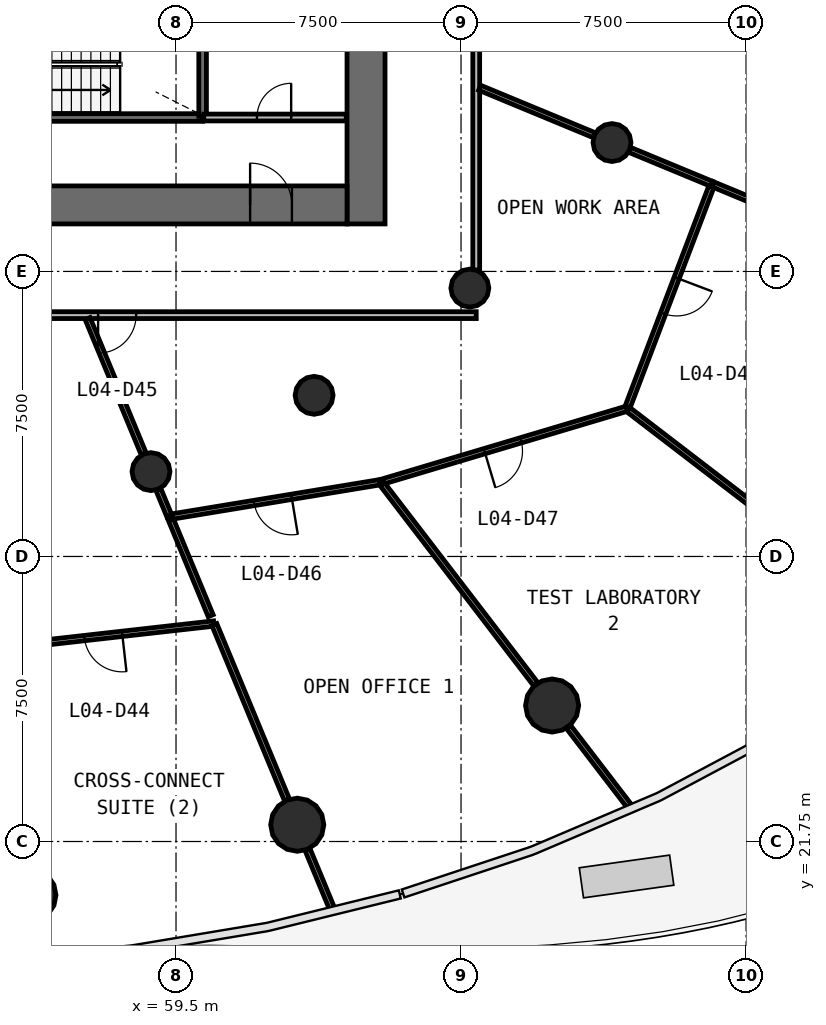
"""IFC4 building model, lengths in metres.
Left out: names, types, materials, properties, quantities, classifications, styles, units other than length and angle.
Written with IfcOpenShell. Run it as: python <this file> out.ifc"""

import sys

from ifc_helpers import new_model, si_unit, direction, frame, frame_2d, origin, origin_2d, place, context, subcontext, project, spatial, rectangle, circle, extrude, source, transform, mapped, element, fill, save


model = new_model("IFC4")
c1 = context("Model", 3, precision=1e-05, world=origin(), true_north=direction((0.0, 1.0)))
c2 = subcontext(c1, "Body", "Model", "MODEL_VIEW")
j1 = project(units=[si_unit("LENGTHUNIT", "METRE"), si_unit("PLANEANGLEUNIT", "RADIAN")], contexts=[c1])
p1 = place(None, origin())
s1 = spatial("IfcSite", under=j1, at=p1, CompositionType="ELEMENT")
p2 = place(p1, origin())
s2 = spatial("IfcBuilding", under=s1, at=p2, CompositionType="ELEMENT")
p3 = place(p2, frame((0.0, 0.0, 18.2)))
s3 = spatial("IfcBuildingStorey", under=s2, at=p3, CompositionType="ELEMENT", Elevation=18.2)
p4 = place(p3, frame((64.5, 38.0, 0.0), z_axis=(0.0, 0.0, 1.0), x_axis=(0.0, 1.0, 0.0)))
e1 = element("IfcWall", 1, at=p4, inside=s3, PredefinedType="SHEAR", context=c2, shape_type="SweptSolid", body=[
    extrude(rectangle(XDim=20.0, YDim=1.0, at=frame_2d((10.0, 0.0))), origin(), (0.0, 0.0, 1.0), 4.4),
])
p5 = place(p4, frame((9.1, 0.0, 0.0)))
e2 = element("IfcOpeningElement", 2, at=p5, cuts=e1, PredefinedType="OPENING", context=c2, shape_type="SweptSolid", body=[
    extrude(rectangle(XDim=1.8, YDim=2.1, at=frame_2d((0.9, 1.05))), frame((0.0, 0.51, 0.0), z_axis=(0.0, -1.0, 0.0), x_axis=(1.0, 0.0, 0.0)), (0.0, 0.0, 1.0), 1.02),
])
p6 = place(p3, frame((40.0, 38.5, 0.0), z_axis=(0.0, 0.0, 1.0), x_axis=(1.0, 0.0, 0.0)))
e3 = element("IfcWall", 3, at=p6, inside=s3, PredefinedType="SHEAR", context=c2, shape_type="SweptSolid", body=[
    extrude(rectangle(XDim=24.0, YDim=1.0, at=frame_2d((12.0, 0.0))), origin(), (0.0, 0.0, 1.0), 4.4),
])
p7 = place(p6, frame((21.45, 0.0, 0.0)))
e4 = element("IfcOpeningElement", 4, at=p7, cuts=e3, PredefinedType="OPENING", context=c2, shape_type="SweptSolid", body=[
    extrude(rectangle(XDim=1.1, YDim=2.1, at=frame_2d((0.55, 1.05))), frame((0.0, 0.51, 0.0), z_axis=(0.0, -1.0, 0.0), x_axis=(1.0, 0.0, 0.0)), (0.0, 0.0, 1.0), 1.02),
])
p8 = place(p6, frame((1.95, 0.0, 0.0)))
e5 = element("IfcOpeningElement", 5, at=p8, cuts=e3, PredefinedType="OPENING", context=c2, shape_type="SweptSolid", body=[
    extrude(rectangle(XDim=1.1, YDim=2.1, at=frame_2d((0.55, 1.05))), frame((0.0, 0.51, 0.0), z_axis=(0.0, -1.0, 0.0), x_axis=(1.0, 0.0, 0.0)), (0.0, 0.0, 1.0), 1.02),
])
m1 = source(origin(), c2, "Body", "SweptSolid", [
    extrude(circle(Radius=0.7, at=origin_2d()), origin(), (0.0, 0.0, 1.0), 4.4),
])
for number, where, z_axis, x_axis in (
    (6, (55.642, 20.339, 0.0), (0.0, 0.0, 1.0), (1.0, 0.0, 0.0)),
    (7, (62.69, 22.191, 0.0), (0.0, 0.0, 1.0), (1.0, 0.0, 0.0)),
    (8, (69.396, 25.328, 0.0), (0.0, 0.0, 1.0), (1.0, 0.0, 0.0)),
):
    element("IfcColumn", number, at=place(p3, frame(where, z_axis=z_axis, x_axis=x_axis)), inside=s3, PredefinedType="COLUMN", context=c2, shape_type="MappedRepresentation", body=[
        mapped(m1, transform((0.0, 0.0, 0.0), scale=1.0)),
    ])
m2 = source(origin(), c2, "Body", "SweptSolid", [
    extrude(circle(Radius=0.5, at=origin_2d()), origin(), (0.0, 0.0, 1.0), 4.4),
])
for number, where, z_axis, x_axis in (
    (9, (58.842, 31.482, 0.0), (0.0, 0.0, 1.0), (1.0, 0.0, 0.0)),
    (10, (63.134, 33.49, 0.0), (0.0, 0.0, 1.0), (1.0, 0.0, 0.0)),
    (11, (67.232, 36.312, 0.0), (0.0, 0.0, 1.0), (1.0, 0.0, 0.0)),
    (12, (70.972, 40.141, 0.0), (0.0, 0.0, 1.0), (1.0, 0.0, 0.0)),
):
    element("IfcColumn", number, at=place(p3, frame(where, z_axis=z_axis, x_axis=x_axis)), inside=s3, PredefinedType="COLUMN", context=c2, shape_type="MappedRepresentation", body=[
        mapped(m2, transform((0.0, 0.0, 0.0), scale=1.0)),
    ])
p9 = place(p3, frame((53.6, 40.8, 0.0), z_axis=(0.0, 0.0, 1.0), x_axis=(1.0, 0.0, 0.0)))
e13 = element("IfcWall", 13, at=p9, inside=s3, PredefinedType="SOLIDWALL", context=c2, shape_type="SweptSolid", body=[
    extrude(rectangle(XDim=6.6, YDim=0.2, at=frame_2d((3.3, 0.0))), origin(), (0.0, 0.0, 1.0), 3.95),
])
p10 = place(p9, frame((0.3, 0.0, 0.0)))
e14 = element("IfcOpeningElement", 14, at=p10, cuts=e13, PredefinedType="OPENING", context=c2, shape_type="SweptSolid", body=[
    extrude(rectangle(XDim=1.2, YDim=2.1, at=frame_2d((0.6, 1.05))), frame((0.0, 0.11, 0.0), z_axis=(0.0, -1.0, 0.0), x_axis=(1.0, 0.0, 0.0)), (0.0, 0.0, 1.0), 0.22),
])
p11 = place(p3, frame((60.2, 40.83, 0.0), z_axis=(0.0, 0.0, 1.0), x_axis=(0.0, 1.0, 0.0)))
e15 = element("IfcWall", 15, at=p11, inside=s3, PredefinedType="SOLIDWALL", context=c2, shape_type="SweptSolid", body=[
    extrude(rectangle(XDim=2.77, YDim=0.2, at=frame_2d((1.385, 0.0))), origin(), (0.0, 0.0, 1.0), 3.95),
])
p12 = place(p3, frame((67.4, 35.6, 0.0), z_axis=(0.0, 0.0, 1.0), x_axis=(-1.0, 0.0, 0.0)))
e16 = element("IfcWall", 16, at=p12, inside=s3, PredefinedType="PARTITIONING", context=c2, shape_type="SweptSolid", body=[
    extrude(rectangle(XDim=30.8, YDim=0.18, at=frame_2d((15.4, 0.0))), origin(), (0.0, 0.0, 1.0), 3.15),
])
p13 = place(p12, frame((25.55, 0.0, 0.0)))
e17 = element("IfcOpeningElement", 17, at=p13, cuts=e16, PredefinedType="OPENING", context=c2, shape_type="SweptSolid", body=[
    extrude(rectangle(XDim=1.0, YDim=2.1, at=frame_2d((0.5, 1.05))), frame((0.0, 0.1, 0.0), z_axis=(0.0, -1.0, 0.0), x_axis=(1.0, 0.0, 0.0)), (0.0, 0.0, 1.0), 0.2),
])
p14 = place(p12, frame((14.95, 0.0, 0.0)))
e18 = element("IfcOpeningElement", 18, at=p14, cuts=e16, PredefinedType="OPENING", context=c2, shape_type="SweptSolid", body=[
    extrude(rectangle(XDim=1.0, YDim=2.1, at=frame_2d((0.5, 1.05))), frame((0.0, 0.1, 0.0), z_axis=(0.0, -1.0, 0.0), x_axis=(1.0, 0.0, 0.0)), (0.0, 0.0, 1.0), 0.2),
])
p15 = place(p12, frame((8.95, 0.0, 0.0)))
e19 = element("IfcOpeningElement", 19, at=p15, cuts=e16, PredefinedType="OPENING", context=c2, shape_type="SweptSolid", body=[
    extrude(rectangle(XDim=1.0, YDim=2.1, at=frame_2d((0.5, 1.05))), frame((0.0, 0.1, 0.0), z_axis=(0.0, -1.0, 0.0), x_axis=(1.0, 0.0, 0.0)), (0.0, 0.0, 1.0), 0.2),
])
p16 = place(p3, frame((67.4, 60.37, 0.0), z_axis=(0.0, 0.0, 1.0), x_axis=(0.0, -1.0, 0.0)))
e20 = element("IfcWall", 20, at=p16, inside=s3, PredefinedType="PARTITIONING", context=c2, shape_type="SweptSolid", body=[
    extrude(rectangle(XDim=23.583, YDim=0.18, at=frame_2d((11.791, 0.0))), origin(), (0.0, 0.0, 1.0), 3.15),
])
p17 = place(p16, frame((11.333, 0.0, 0.0)))
e21 = element("IfcOpeningElement", 21, at=p17, cuts=e20, PredefinedType="OPENING", context=c2, shape_type="SweptSolid", body=[
    extrude(rectangle(XDim=1.0, YDim=2.1, at=frame_2d((0.5, 1.05))), frame((0.0, 0.1, 0.0), z_axis=(0.0, -1.0, 0.0), x_axis=(1.0, 0.0, 0.0)), (0.0, 0.0, 1.0), 0.2),
])
p18 = place(p16, frame((4.532, 0.0, 0.0)))
e22 = element("IfcOpeningElement", 22, at=p18, cuts=e20, PredefinedType="OPENING", context=c2, shape_type="SweptSolid", body=[
    extrude(rectangle(XDim=1.0, YDim=2.1, at=frame_2d((0.5, 1.05))), frame((0.0, 0.1, 0.0), z_axis=(0.0, -1.0, 0.0), x_axis=(1.0, 0.0, 0.0)), (0.0, 0.0, 1.0), 0.2),
])
p19 = place(p3, frame((60.23, 40.8, 0.0), z_axis=(0.0, 0.0, 1.0), x_axis=(1.0, 0.0, 0.0)))
e23 = element("IfcWall", 23, at=p19, inside=s3, PredefinedType="PARTITIONING", context=c2, shape_type="SweptSolid", body=[
    extrude(rectangle(XDim=3.75, YDim=0.18, at=frame_2d((1.875, 0.0))), origin(), (0.0, 0.0, 1.0), 3.95),
])
p20 = place(p19, frame((1.4, 0.0, 0.0)))
e24 = element("IfcOpeningElement", 24, at=p20, cuts=e23, PredefinedType="OPENING", context=c2, shape_type="SweptSolid", body=[
    extrude(rectangle(XDim=0.9, YDim=2.1, at=frame_2d((0.45, 1.05))), frame((0.0, 0.1, 0.0), z_axis=(0.0, -1.0, 0.0), x_axis=(1.0, 0.0, 0.0)), (0.0, 0.0, 1.0), 0.2),
])
p21 = place(p3, frame((73.613, 39.048, 0.0), z_axis=(0.0, 0.0, 1.0), x_axis=(0.923869702123, -0.382707164159, 0.0)))
e25 = element("IfcWall", 25, at=p21, inside=s3, PredefinedType="PARTITIONING", context=c2, shape_type="SweptSolid", body=[
    extrude(rectangle(XDim=7.989, YDim=0.14, at=frame_2d((3.994, 0.0))), origin(), (0.0, 0.0, 1.0), 3.15),
])
p22 = place(p3, frame((71.367, 33.139, 0.0), z_axis=(0.0, 0.0, 1.0), x_axis=(-0.958287066923, -0.285807448063, 0.0)))
e26 = element("IfcWall", 26, at=p22, inside=s3, PredefinedType="PARTITIONING", context=c2, shape_type="SweptSolid", body=[
    extrude(rectangle(XDim=6.763, YDim=0.14, at=frame_2d((3.381, 0.0))), origin(), (0.0, 0.0, 1.0), 3.15),
])
p23 = place(p22, frame((2.913, 0.0, 0.0)))
e27 = element("IfcOpeningElement", 27, at=p23, cuts=e26, PredefinedType="OPENING", context=c2, shape_type="SweptSolid", body=[
    extrude(rectangle(XDim=1.0, YDim=2.1, at=frame_2d((0.5, 1.05))), frame((0.0, 0.08, 0.0), z_axis=(0.0, -1.0, 0.0), x_axis=(1.0, 0.0, 0.0)), (0.0, 0.0, 1.0), 0.16),
])
p24 = place(p3, frame((64.932, 31.147, 0.0), z_axis=(0.0, 0.0, 1.0), x_axis=(0.608760039418, -0.79335440656, 0.0)))
e28 = element("IfcWall", 28, at=p24, inside=s3, PredefinedType="PARTITIONING", context=c2, shape_type="SweptSolid", body=[
    extrude(rectangle(XDim=6.63, YDim=0.14, at=frame_2d((3.315, 0.0))), origin(), (0.0, 0.0, 1.0), 3.15),
])
p25 = place(p3, frame((73.588, 38.982, 0.0), z_axis=(0.0, 0.0, 1.0), x_axis=(-0.355244508987, -0.934773415772, 0.0)))
e29 = element("IfcWall", 29, at=p25, inside=s3, PredefinedType="PARTITIONING", context=c2, shape_type="SweptSolid", body=[
    extrude(rectangle(XDim=6.221, YDim=0.14, at=frame_2d((3.11, 0.0))), origin(), (0.0, 0.0, 1.0), 3.15),
])
p26 = place(p25, frame((2.571, 0.0, 0.0)))
e30 = element("IfcOpeningElement", 30, at=p26, cuts=e29, PredefinedType="OPENING", context=c2, shape_type="SweptSolid", body=[
    extrude(rectangle(XDim=1.0, YDim=2.1, at=frame_2d((0.5, 1.05))), frame((0.0, 0.08, 0.0), z_axis=(0.0, -1.0, 0.0), x_axis=(1.0, 0.0, 0.0)), (0.0, 0.0, 1.0), 0.16),
])
p27 = place(p3, frame((60.497, 27.486, 0.0), z_axis=(0.0, 0.0, 1.0), x_axis=(-0.993731256448, -0.111795303828, 0.0)))
e31 = element("IfcWall", 31, at=p27, inside=s3, PredefinedType="PARTITIONING", context=c2, shape_type="SweptSolid", body=[
    extrude(rectangle(XDim=5.678, YDim=0.14, at=frame_2d((2.839, 0.0))), origin(), (0.0, 0.0, 1.0), 3.15),
])
p28 = place(p27, frame((2.428, 0.0, 0.0)))
e32 = element("IfcOpeningElement", 32, at=p28, cuts=e31, PredefinedType="OPENING", context=c2, shape_type="SweptSolid", body=[
    extrude(rectangle(XDim=1.0, YDim=2.1, at=frame_2d((0.5, 1.05))), frame((0.0, 0.08, 0.0), z_axis=(0.0, -1.0, 0.0), x_axis=(1.0, 0.0, 0.0)), (0.0, 0.0, 1.0), 0.16),
])
p29 = place(p3, frame((64.857, 31.201, 0.0), z_axis=(0.0, 0.0, 1.0), x_axis=(-0.986684787107, -0.162644184928, 0.0)))
e33 = element("IfcWall", 33, at=p29, inside=s3, PredefinedType="PARTITIONING", context=c2, shape_type="SweptSolid", body=[
    extrude(rectangle(XDim=5.596, YDim=0.14, at=frame_2d((2.798, 0.0))), origin(), (0.0, 0.0, 1.0), 3.15),
])
p30 = place(p29, frame((2.346, 0.0, 0.0)))
e34 = element("IfcOpeningElement", 34, at=p30, cuts=e33, PredefinedType="OPENING", context=c2, shape_type="SweptSolid", body=[
    extrude(rectangle(XDim=1.0, YDim=2.1, at=frame_2d((0.5, 1.05))), frame((0.0, 0.08, 0.0), z_axis=(0.0, -1.0, 0.0), x_axis=(1.0, 0.0, 0.0)), (0.0, 0.0, 1.0), 0.16),
])
p31 = place(p3, frame((60.509, 27.458, 0.0), z_axis=(0.0, 0.0, 1.0), x_axis=(0.382671202129, -0.923884598346, 0.0)))
e35 = element("IfcWall", 35, at=p31, inside=s3, PredefinedType="PARTITIONING", context=c2, shape_type="SweptSolid", body=[
    extrude(rectangle(XDim=4.995, YDim=0.14, at=frame_2d((2.498, 0.0))), origin(), (0.0, 0.0, 1.0), 3.15),
])
p32 = place(p3, frame((71.391, 33.121, 0.0), z_axis=(0.0, 0.0, 1.0), x_axis=(0.79336750658, -0.608742966697, 0.0)))
e36 = element("IfcWall", 36, at=p32, inside=s3, PredefinedType="PARTITIONING", context=c2, shape_type="SweptSolid", body=[
    extrude(rectangle(XDim=4.854, YDim=0.14, at=frame_2d((2.427, 0.0))), origin(), (0.0, 0.0, 1.0), 3.15),
])
p33 = place(p3, frame((57.174, 35.51, 0.0), z_axis=(0.0, 0.0, 1.0), x_axis=(0.382644558062, -0.923895633817, 0.0)))
e37 = element("IfcWall", 37, at=p33, inside=s3, PredefinedType="PARTITIONING", context=c2, shape_type="SweptSolid", body=[
    extrude(rectangle(XDim=3.854, YDim=0.14, at=frame_2d((1.927, 0.0))), origin(), (0.0, 0.0, 1.0), 3.15),
])
p34 = place(p3, frame((71.439, 39.948, 0.0), z_axis=(0.0, 0.0, 1.0), x_axis=(0.923861804277, -0.382726229306, 0.0)))
e38 = element("IfcWall", 38, at=p34, inside=s3, PredefinedType="PARTITIONING", context=c2, shape_type="SweptSolid", body=[
    extrude(rectangle(XDim=2.323, YDim=0.14, at=frame_2d((1.161, 0.0))), origin(), (0.0, 0.0, 1.0), 3.15),
])
p35 = place(p3, frame((67.49, 41.584, 0.0), z_axis=(0.0, 0.0, 1.0), x_axis=(0.923911109142, -0.382607190737, 0.0)))
e39 = element("IfcWall", 39, at=p35, inside=s3, PredefinedType="PARTITIONING", context=c2, shape_type="SweptSolid", body=[
    extrude(rectangle(XDim=3.264, YDim=0.14, at=frame_2d((1.632, 0.0))), origin(), (0.0, 0.0, 1.0), 3.15),
])
p36 = place(p3, frame((59.363, 30.225, 0.0), z_axis=(0.0, 0.0, 1.0), x_axis=(0.382661079663, -0.923888790987, 0.0)))
e40 = element("IfcWall", 40, at=p36, inside=s3, PredefinedType="PARTITIONING", context=c2, shape_type="SweptSolid", body=[
    extrude(rectangle(XDim=2.742, YDim=0.14, at=frame_2d((1.371, 0.0))), origin(), (0.0, 0.0, 1.0), 3.15),
])
p37 = place(p3, frame((69.825, 24.77, 0.0), z_axis=(0.0, 0.0, 1.0), x_axis=(0.608811983243, -0.793314546104, 0.0)))
e41 = element("IfcWall", 41, at=p37, inside=s3, PredefinedType="PARTITIONING", context=c2, shape_type="SweptSolid", body=[
    extrude(rectangle(XDim=2.627, YDim=0.14, at=frame_2d((1.313, 0.0))), origin(), (0.0, 0.0, 1.0), 3.15),
])
p38 = place(p3, frame((62.96, 21.54, 0.0), z_axis=(0.0, 0.0, 1.0), x_axis=(0.382571117301, -0.923926046936, 0.0)))
e42 = element("IfcWall", 42, at=p38, inside=s3, PredefinedType="PARTITIONING", context=c2, shape_type="SweptSolid", body=[
    extrude(rectangle(XDim=1.671, YDim=0.14, at=frame_2d((0.836, 0.0))), origin(), (0.0, 0.0, 1.0), 3.15),
])
p39 = place(p3, frame((59.035, 31.016, 0.0), z_axis=(0.0, 0.0, 1.0), x_axis=(0.382799508823, -0.923831443525, 0.0)))
e43 = element("IfcWall", 43, at=p39, inside=s3, PredefinedType="PARTITIONING", context=c2, shape_type="SweptSolid", body=[
    extrude(rectangle(XDim=0.754, YDim=0.14, at=frame_2d((0.377, 0.0))), origin(), (0.0, 0.0, 1.0), 3.15),
])
m3 = source(origin(), c2, "Body", "SweptSolid", [
    extrude(rectangle(XDim=1.1, YDim=2.1, at=frame_2d((0.55, 1.05))), frame((0.0, 0.025, 0.0), z_axis=(0.0, -1.0, 0.0), x_axis=(1.0, 0.0, 0.0)), (0.0, 0.0, 1.0), 0.05),
])
p40 = place(p7, origin())
e44 = element("IfcDoor", 44, at=p40, inside=s3, OperationType="SINGLE_SWING_LEFT", PredefinedType="DOOR", context=c2, shape_type="MappedRepresentation", body=[
    mapped(m3, transform((0.0, 0.0, 0.0), scale=1.0)),
])
fill(e4, e44)
m4 = source(origin(), c2, "Body", "SweptSolid", [
    extrude(rectangle(XDim=1.0, YDim=2.1, at=frame_2d((0.5, 1.05))), frame((0.0, 0.025, 0.0), z_axis=(0.0, -1.0, 0.0), x_axis=(1.0, 0.0, 0.0)), (0.0, 0.0, 1.0), 0.05),
])
p41 = place(p28, origin())
e45 = element("IfcDoor", 45, at=p41, inside=s3, OperationType="SINGLE_SWING_LEFT", PredefinedType="DOOR", context=c2, shape_type="MappedRepresentation", body=[
    mapped(m4, transform((0.0, 0.0, 0.0), scale=1.0)),
])
fill(e32, e45)
p42 = place(p15, origin())
e46 = element("IfcDoor", 46, at=p42, inside=s3, OperationType="SINGLE_SWING_RIGHT", PredefinedType="DOOR", context=c2, shape_type="MappedRepresentation", body=[
    mapped(m4, transform((0.0, 0.0, 0.0), scale=1.0)),
])
fill(e19, e46)
p43 = place(p30, origin())
e47 = element("IfcDoor", 47, at=p43, inside=s3, OperationType="SINGLE_SWING_LEFT", PredefinedType="DOOR", context=c2, shape_type="MappedRepresentation", body=[
    mapped(m4, transform((0.0, 0.0, 0.0), scale=1.0)),
])
fill(e34, e47)
p44 = place(p23, origin())
e48 = element("IfcDoor", 48, at=p44, inside=s3, OperationType="SINGLE_SWING_RIGHT", PredefinedType="DOOR", context=c2, shape_type="MappedRepresentation", body=[
    mapped(m4, transform((0.0, 0.0, 0.0), scale=1.0)),
])
fill(e27, e48)
p45 = place(p26, origin())
e49 = element("IfcDoor", 49, at=p45, inside=s3, OperationType="SINGLE_SWING_LEFT", PredefinedType="DOOR", context=c2, shape_type="MappedRepresentation", body=[
    mapped(m4, transform((0.0, 0.0, 0.0), scale=1.0)),
])
fill(e30, e49)
m5 = source(origin(), c2, "Body", "SweptSolid", [
    extrude(rectangle(XDim=0.9, YDim=2.1, at=frame_2d((0.45, 1.05))), frame((0.0, 0.025, 0.0), z_axis=(0.0, -1.0, 0.0), x_axis=(1.0, 0.0, 0.0)), (0.0, 0.0, 1.0), 0.05),
])
p46 = place(p20, origin())
e50 = element("IfcDoor", 50, at=p46, inside=s3, OperationType="SINGLE_SWING_RIGHT", PredefinedType="DOOR", context=c2, shape_type="MappedRepresentation", body=[
    mapped(m5, transform((0.0, 0.0, 0.0), scale=1.0)),
])
fill(e24, e50)
save(model, sys.argv[1])
